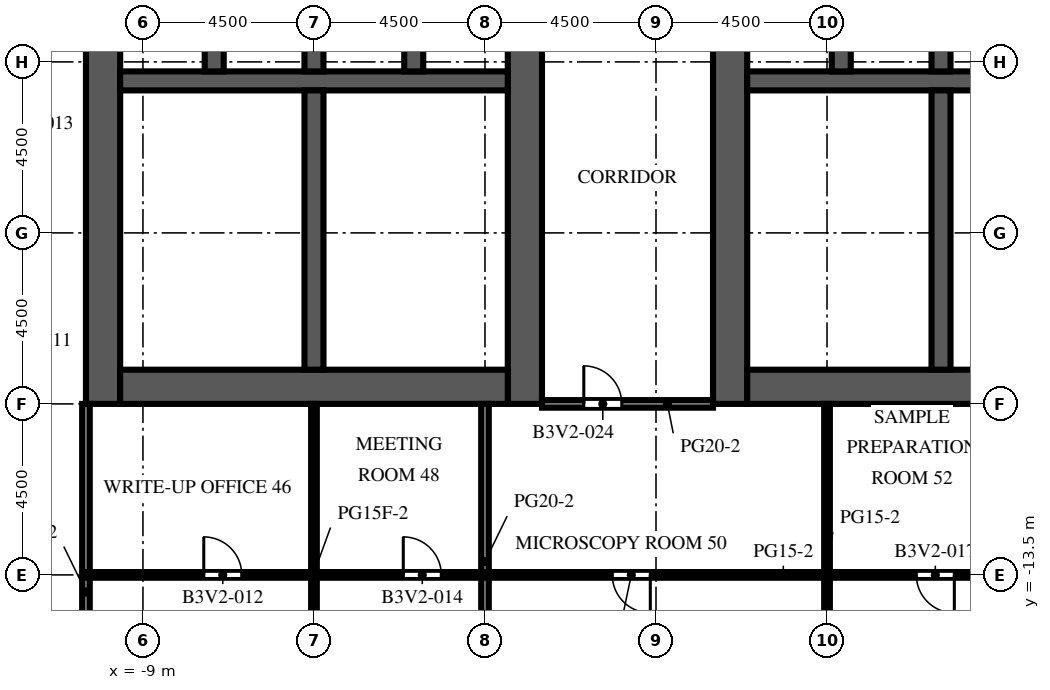
"""IFC4 building model, lengths in metres.
Left out: names, types, materials, properties, quantities, classifications, styles, units other than length and angle.
Written with IfcOpenShell. Run it as: python <this file> out.ifc"""

import sys

from ifc_helpers import new_model, si_unit, direction, frame, frame_2d, origin, place, context, subcontext, project, spatial, rectangle, extrude, element, fill, save


model = new_model("IFC4")
c1 = context("Model", 3, precision=1e-05, world=origin(), true_north=direction((0.0, 1.0)))
c2 = subcontext(c1, "Body", "Model", "MODEL_VIEW")
j1 = project(units=[si_unit("LENGTHUNIT", "METRE"), si_unit("PLANEANGLEUNIT", "RADIAN")], contexts=[c1])
p1 = place(None, origin())
s1 = spatial("IfcSite", under=j1, at=p1, CompositionType="ELEMENT")
p2 = place(p1, origin())
s2 = spatial("IfcBuilding", under=s1, at=p2, CompositionType="ELEMENT")
p3 = place(p2, frame((0.0, 0.0, 106.6)))
s3 = spatial("IfcBuildingStorey", under=s2, at=p3, CompositionType="ELEMENT", Elevation=106.6)
p4 = place(p3, frame((-10.05, -9.0, 0.0), z_axis=(0.0, 0.0, 1.0), x_axis=(0.0, 1.0, 0.0)))
e1 = element("IfcWall", 1, at=p4, inside=s3, PredefinedType="SHEAR", context=c2, shape_type="SweptSolid", body=[
    extrude(rectangle(XDim=27.5, YDim=0.9, at=frame_2d((13.75, 0.0))), origin(), (0.0, 0.0, 1.0), 4.1),
])
p5 = place(p4, frame((12.55, 0.0, 0.0)))
e2 = element("IfcOpeningElement", 2, at=p5, cuts=e1, PredefinedType="OPENING", context=c2, shape_type="SweptSolid", body=[
    extrude(rectangle(XDim=2.4, YDim=2.4, at=frame_2d((1.2, 1.2))), frame((0.0, 0.46, 0.0), z_axis=(0.0, -1.0, 0.0), x_axis=(1.0, 0.0, 0.0)), (0.0, 0.0, 1.0), 0.92),
])
p6 = place(p4, frame((6.825, 0.0, 0.0)))
e3 = element("IfcOpeningElement", 3, at=p6, cuts=e1, PredefinedType="OPENING", context=c2, shape_type="SweptSolid", body=[
    extrude(rectangle(XDim=1.2, YDim=2.1, at=frame_2d((0.6, 1.05))), frame((0.0, 0.46, 0.0), z_axis=(0.0, -1.0, 0.0), x_axis=(1.0, 0.0, 0.0)), (0.0, 0.0, 1.0), 0.92),
])
p7 = place(p4, frame((19.475, 0.0, 0.0)))
e4 = element("IfcOpeningElement", 4, at=p7, cuts=e1, PredefinedType="OPENING", context=c2, shape_type="SweptSolid", body=[
    extrude(rectangle(XDim=1.2, YDim=2.1, at=frame_2d((0.6, 1.05))), frame((0.0, 0.46, 0.0), z_axis=(0.0, -1.0, 0.0), x_axis=(1.0, 0.0, 0.0)), (0.0, 0.0, 1.0), 0.92),
])
p8 = place(p3, frame((1.05, -9.0, 0.0), z_axis=(0.0, 0.0, 1.0), x_axis=(0.0, 1.0, 0.0)))
e5 = element("IfcWall", 5, at=p8, inside=s3, PredefinedType="SHEAR", context=c2, shape_type="SweptSolid", body=[
    extrude(rectangle(XDim=27.5, YDim=0.9, at=frame_2d((13.75, 0.0))), origin(), (0.0, 0.0, 1.0), 4.1),
])
p9 = place(p8, frame((12.55, 0.0, 0.0)))
e6 = element("IfcOpeningElement", 6, at=p9, cuts=e5, PredefinedType="OPENING", context=c2, shape_type="SweptSolid", body=[
    extrude(rectangle(XDim=2.4, YDim=2.4, at=frame_2d((1.2, 1.2))), frame((0.0, 0.46, 0.0), z_axis=(0.0, -1.0, 0.0), x_axis=(1.0, 0.0, 0.0)), (0.0, 0.0, 1.0), 0.92),
])
p10 = place(p8, frame((3.893, 0.0, 0.0)))
e7 = element("IfcOpeningElement", 7, at=p10, cuts=e5, PredefinedType="OPENING", context=c2, shape_type="SweptSolid", body=[
    extrude(rectangle(XDim=0.923, YDim=2.1, at=frame_2d((0.461, 1.05))), frame((0.0, 0.46, 0.0), z_axis=(0.0, -1.0, 0.0), x_axis=(1.0, 0.0, 0.0)), (0.0, 0.0, 1.0), 0.92),
])
p11 = place(p8, frame((23.427, 0.0, 0.0)))
e8 = element("IfcOpeningElement", 8, at=p11, cuts=e5, PredefinedType="OPENING", context=c2, shape_type="SweptSolid", body=[
    extrude(rectangle(XDim=1.2, YDim=2.1, at=frame_2d((0.6, 1.05))), frame((0.0, 0.46, 0.0), z_axis=(0.0, -1.0, 0.0), x_axis=(1.0, 0.0, 0.0)), (0.0, 0.0, 1.0), 0.92),
])
p12 = place(p3, frame((-9.6, -8.55, 0.0), z_axis=(0.0, 0.0, 1.0), x_axis=(1.0, 0.0, 0.0)))
e9 = element("IfcWall", 9, at=p12, inside=s3, PredefinedType="SHEAR", context=c2, shape_type="SweptSolid", body=[
    extrude(rectangle(XDim=10.2, YDim=0.9, at=frame_2d((5.1, 0.0))), origin(), (0.0, 0.0, 1.0), 4.1),
])
p13 = place(p3, frame((-9.6, -0.5, 0.0), z_axis=(0.0, 0.0, 1.0), x_axis=(1.0, 0.0, 0.0)))
e10 = element("IfcWall", 10, at=p13, inside=s3, PredefinedType="SHEAR", context=c2, shape_type="SweptSolid", body=[
    extrude(rectangle(XDim=10.2, YDim=0.5, at=frame_2d((5.1, 0.0))), origin(), (0.0, 0.0, 1.0), 4.1),
])
for number, where, z_axis, x_axis in (
    (11, (-7.125, -0.25, 0.0), (0.0, 0.0, 1.0), (0.0, 1.0, 0.0)),
    (12, (-4.5, -0.25, 0.0), (0.0, 0.0, 1.0), (0.0, 1.0, 0.0)),
    (13, (-1.875, -0.25, 0.0), (0.0, 0.0, 1.0), (0.0, 1.0, 0.0)),
):
    element("IfcWall", number, at=place(p3, frame(where, z_axis=z_axis, x_axis=x_axis)), inside=s3, PredefinedType="SHEAR", context=c2, shape_type="SweptSolid", body=[
        extrude(rectangle(XDim=2.8, YDim=0.5, at=frame_2d((1.4, 0.0))), origin(), (0.0, 0.0, 1.0), 4.1),
    ])
p14 = place(p3, frame((-4.5, -8.1, 0.0), z_axis=(0.0, 0.0, 1.0), x_axis=(0.0, 1.0, 0.0)))
e14 = element("IfcWall", 14, at=p14, inside=s3, PredefinedType="SHEAR", context=c2, shape_type="SweptSolid", body=[
    extrude(rectangle(XDim=7.35, YDim=0.5, at=frame_2d((3.675, 0.0))), origin(), (0.0, 0.0, 1.0), 4.1),
])
p15 = place(p3, frame((6.45, -9.0, 0.0), z_axis=(0.0, 0.0, 1.0), x_axis=(0.0, 1.0, 0.0)))
e15 = element("IfcWall", 15, at=p15, inside=s3, PredefinedType="SHEAR", context=c2, shape_type="SweptSolid", body=[
    extrude(rectangle(XDim=27.5, YDim=0.9, at=frame_2d((13.75, 0.0))), origin(), (0.0, 0.0, 1.0), 4.1),
])
p16 = place(p15, frame((12.55, 0.0, 0.0)))
e16 = element("IfcOpeningElement", 16, at=p16, cuts=e15, PredefinedType="OPENING", context=c2, shape_type="SweptSolid", body=[
    extrude(rectangle(XDim=2.4, YDim=2.4, at=frame_2d((1.2, 1.2))), frame((0.0, 0.46, 0.0), z_axis=(0.0, -1.0, 0.0), x_axis=(1.0, 0.0, 0.0)), (0.0, 0.0, 1.0), 0.92),
])
p17 = place(p15, frame((3.893, 0.0, 0.0)))
e17 = element("IfcOpeningElement", 17, at=p17, cuts=e15, PredefinedType="OPENING", context=c2, shape_type="SweptSolid", body=[
    extrude(rectangle(XDim=0.923, YDim=2.1, at=frame_2d((0.461, 1.05))), frame((0.0, 0.46, 0.0), z_axis=(0.0, -1.0, 0.0), x_axis=(1.0, 0.0, 0.0)), (0.0, 0.0, 1.0), 0.92),
])
p18 = place(p15, frame((23.427, 0.0, 0.0)))
e18 = element("IfcOpeningElement", 18, at=p18, cuts=e15, PredefinedType="OPENING", context=c2, shape_type="SweptSolid", body=[
    extrude(rectangle(XDim=1.2, YDim=2.1, at=frame_2d((0.6, 1.05))), frame((0.0, 0.46, 0.0), z_axis=(0.0, -1.0, 0.0), x_axis=(1.0, 0.0, 0.0)), (0.0, 0.0, 1.0), 0.92),
])
p19 = place(p3, frame((6.9, -8.55, 0.0), z_axis=(0.0, 0.0, 1.0), x_axis=(1.0, 0.0, 0.0)))
e19 = element("IfcWall", 19, at=p19, inside=s3, PredefinedType="SHEAR", context=c2, shape_type="SweptSolid", body=[
    extrude(rectangle(XDim=10.2, YDim=0.9, at=frame_2d((5.1, 0.0))), origin(), (0.0, 0.0, 1.0), 4.1),
])
p20 = place(p3, frame((6.9, -0.5, 0.0), z_axis=(0.0, 0.0, 1.0), x_axis=(1.0, 0.0, 0.0)))
e20 = element("IfcWall", 20, at=p20, inside=s3, PredefinedType="SHEAR", context=c2, shape_type="SweptSolid", body=[
    extrude(rectangle(XDim=10.2, YDim=0.5, at=frame_2d((5.1, 0.0))), origin(), (0.0, 0.0, 1.0), 4.1),
])
for number, where, z_axis, x_axis in (
    (21, (9.375, -0.25, 0.0), (0.0, 0.0, 1.0), (0.0, 1.0, 0.0)),
    (22, (12.0, -0.25, 0.0), (0.0, 0.0, 1.0), (0.0, 1.0, 0.0)),
):
    element("IfcWall", number, at=place(p3, frame(where, z_axis=z_axis, x_axis=x_axis)), inside=s3, PredefinedType="SHEAR", context=c2, shape_type="SweptSolid", body=[
        extrude(rectangle(XDim=2.8, YDim=0.5, at=frame_2d((1.4, 0.0))), origin(), (0.0, 0.0, 1.0), 4.1),
    ])
p21 = place(p3, frame((12.0, -8.1, 0.0), z_axis=(0.0, 0.0, 1.0), x_axis=(0.0, 1.0, 0.0)))
e23 = element("IfcWall", 23, at=p21, inside=s3, PredefinedType="SHEAR", context=c2, shape_type="SweptSolid", body=[
    extrude(rectangle(XDim=7.35, YDim=0.5, at=frame_2d((3.675, 0.0))), origin(), (0.0, 0.0, 1.0), 4.1),
])
p22 = place(p3, frame((-4.25, -5.307, 0.0), z_axis=(0.0, 0.0, 1.0), x_axis=(1.0, 0.0, 0.0)))
e24 = element("IfcWall", 24, at=p22, inside=s3, PredefinedType="PARTITIONING", context=c2, shape_type="SweptSolid", body=[
    extrude(rectangle(XDim=4.85, YDim=0.1, at=frame_2d((2.425, 0.0))), origin(), (0.0, 0.0, 1.0), 3.5),
])
p23 = place(p22, frame((1.925, 0.0, 0.0)))
e25 = element("IfcOpeningElement", 25, at=p23, cuts=e24, PredefinedType="OPENING", context=c2, shape_type="SweptSolid", body=[
    extrude(rectangle(XDim=1.0, YDim=2.1, at=frame_2d((0.5, 1.05))), frame((0.0, 0.06, 0.0), z_axis=(0.0, -1.0, 0.0), x_axis=(1.0, 0.0, 0.0)), (0.0, 0.0, 1.0), 0.12),
])
p24 = place(p3, frame((-2.407, -3.984, 0.0), z_axis=(0.0, 0.0, 1.0), x_axis=(1.0, 0.0, 0.0)))
e26 = element("IfcWall", 26, at=p24, inside=s3, PredefinedType="PARTITIONING", context=c2, shape_type="SweptSolid", body=[
    extrude(rectangle(XDim=3.007, YDim=0.1, at=frame_2d((1.503, 0.0))), origin(), (0.0, 0.0, 1.0), 3.5),
])
p25 = place(p24, frame((1.003, 0.0, 0.0)))
e27 = element("IfcOpeningElement", 27, at=p25, cuts=e26, PredefinedType="OPENING", context=c2, shape_type="SweptSolid", body=[
    extrude(rectangle(XDim=1.0, YDim=2.1, at=frame_2d((0.5, 1.05))), frame((0.0, 0.06, 0.0), z_axis=(0.0, -1.0, 0.0), x_axis=(1.0, 0.0, 0.0)), (0.0, 0.0, 1.0), 0.12),
])
p26 = place(p3, frame((-4.25, -3.984, 0.0), z_axis=(0.0, 0.0, 1.0), x_axis=(1.0, 0.0, 0.0)))
e28 = element("IfcWall", 28, at=p26, inside=s3, PredefinedType="PARTITIONING", context=c2, shape_type="SweptSolid", body=[
    extrude(rectangle(XDim=1.843, YDim=0.1, at=frame_2d((0.921, 0.0))), origin(), (0.0, 0.0, 1.0), 3.5),
])
p27 = place(p26, frame((0.421, 0.0, 0.0)))
e29 = element("IfcOpeningElement", 29, at=p27, cuts=e28, PredefinedType="OPENING", context=c2, shape_type="SweptSolid", body=[
    extrude(rectangle(XDim=1.0, YDim=2.1, at=frame_2d((0.5, 1.05))), frame((0.0, 0.06, 0.0), z_axis=(0.0, -1.0, 0.0), x_axis=(1.0, 0.0, 0.0)), (0.0, 0.0, 1.0), 0.12),
])
p28 = place(p3, frame((-2.407, -3.984, 0.0), z_axis=(0.0, 0.0, 1.0), x_axis=(0.0, 1.0, 0.0)))
e30 = element("IfcWall", 30, at=p28, inside=s3, PredefinedType="PARTITIONING", context=c2, shape_type="SweptSolid", body=[
    extrude(rectangle(XDim=3.234, YDim=0.1, at=frame_2d((1.617, 0.0))), origin(), (0.0, 0.0, 1.0), 3.5),
])
p29 = place(p3, frame((6.9, -5.307, 0.0), z_axis=(0.0, 0.0, 1.0), x_axis=(1.0, 0.0, 0.0)))
e31 = element("IfcWall", 31, at=p29, inside=s3, PredefinedType="PARTITIONING", context=c2, shape_type="SweptSolid", body=[
    extrude(rectangle(XDim=4.85, YDim=0.1, at=frame_2d((2.425, 0.0))), origin(), (0.0, 0.0, 1.0), 3.5),
])
p30 = place(p29, frame((1.925, 0.0, 0.0)))
e32 = element("IfcOpeningElement", 32, at=p30, cuts=e31, PredefinedType="OPENING", context=c2, shape_type="SweptSolid", body=[
    extrude(rectangle(XDim=1.0, YDim=2.1, at=frame_2d((0.5, 1.05))), frame((0.0, 0.06, 0.0), z_axis=(0.0, -1.0, 0.0), x_axis=(1.0, 0.0, 0.0)), (0.0, 0.0, 1.0), 0.12),
])
p31 = place(p3, frame((6.9, -3.984, 0.0), z_axis=(0.0, 0.0, 1.0), x_axis=(1.0, 0.0, 0.0)))
e33 = element("IfcWall", 33, at=p31, inside=s3, PredefinedType="PARTITIONING", context=c2, shape_type="SweptSolid", body=[
    extrude(rectangle(XDim=3.007, YDim=0.1, at=frame_2d((1.503, 0.0))), origin(), (0.0, 0.0, 1.0), 3.5),
])
p32 = place(p31, frame((1.003, 0.0, 0.0)))
e34 = element("IfcOpeningElement", 34, at=p32, cuts=e33, PredefinedType="OPENING", context=c2, shape_type="SweptSolid", body=[
    extrude(rectangle(XDim=1.0, YDim=2.1, at=frame_2d((0.5, 1.05))), frame((0.0, 0.06, 0.0), z_axis=(0.0, -1.0, 0.0), x_axis=(1.0, 0.0, 0.0)), (0.0, 0.0, 1.0), 0.12),
])
p33 = place(p3, frame((9.907, -3.984, 0.0), z_axis=(0.0, 0.0, 1.0), x_axis=(1.0, 0.0, 0.0)))
e35 = element("IfcWall", 35, at=p33, inside=s3, PredefinedType="PARTITIONING", context=c2, shape_type="SweptSolid", body=[
    extrude(rectangle(XDim=1.843, YDim=0.1, at=frame_2d((0.921, 0.0))), origin(), (0.0, 0.0, 1.0), 3.5),
])
p34 = place(p33, frame((0.421, 0.0, 0.0)))
e36 = element("IfcOpeningElement", 36, at=p34, cuts=e35, PredefinedType="OPENING", context=c2, shape_type="SweptSolid", body=[
    extrude(rectangle(XDim=1.0, YDim=2.1, at=frame_2d((0.5, 1.05))), frame((0.0, 0.06, 0.0), z_axis=(0.0, -1.0, 0.0), x_axis=(1.0, 0.0, 0.0)), (0.0, 0.0, 1.0), 0.12),
])
p35 = place(p3, frame((9.907, -3.984, 0.0), z_axis=(0.0, 0.0, 1.0), x_axis=(0.0, 1.0, 0.0)))
e37 = element("IfcWall", 37, at=p35, inside=s3, PredefinedType="PARTITIONING", context=c2, shape_type="SweptSolid", body=[
    extrude(rectangle(XDim=3.234, YDim=0.1, at=frame_2d((1.617, 0.0))), origin(), (0.0, 0.0, 1.0), 3.5),
])
p36 = place(p3, frame((-10.5, -9.0, 0.0), z_axis=(0.0, 0.0, 1.0), x_axis=(0.0, -1.0, 0.0)))
e38 = element("IfcWall", 38, at=p36, inside=s3, PredefinedType="PARTITIONING", context=c2, shape_type="SweptSolid", body=[
    extrude(rectangle(XDim=13.35, YDim=0.2, at=frame_2d((6.675, 0.0))), origin(), (0.0, 0.0, 1.0), 3.5),
])
p37 = place(p36, frame((9.9, 0.0, 0.0)))
e39 = element("IfcOpeningElement", 39, at=p37, cuts=e38, PredefinedType="OPENING", context=c2, shape_type="SweptSolid", body=[
    extrude(rectangle(XDim=1.0, YDim=2.1, at=frame_2d((0.5, 1.05))), frame((0.0, 0.11, 0.0), z_axis=(0.0, -1.0, 0.0), x_axis=(1.0, 0.0, 0.0)), (0.0, 0.0, 1.0), 0.22),
])
p38 = place(p3, frame((-4.5, -9.0, 0.0), z_axis=(0.0, 0.0, 1.0), x_axis=(0.0, -1.0, 0.0)))
e40 = element("IfcWall", 40, at=p38, inside=s3, PredefinedType="PARTITIONING", context=c2, shape_type="SweptSolid", body=[
    extrude(rectangle(XDim=12.9, YDim=0.15, at=frame_2d((6.45, 0.0))), origin(), (0.0, 0.0, 1.0), 3.5),
])
p39 = place(p38, frame((8.9, 0.0, 0.0)))
e41 = element("IfcOpeningElement", 41, at=p39, cuts=e40, PredefinedType="OPENING", context=c2, shape_type="SweptSolid", body=[
    extrude(rectangle(XDim=1.0, YDim=2.1, at=frame_2d((0.5, 1.05))), frame((0.0, 0.085, 0.0), z_axis=(0.0, -1.0, 0.0), x_axis=(1.0, 0.0, 0.0)), (0.0, 0.0, 1.0), 0.17),
])
p40 = place(p3, frame((0.0, -17.3, 0.0), z_axis=(0.0, 0.0, 1.0), x_axis=(0.0, 1.0, 0.0)))
e42 = element("IfcWall", 42, at=p40, inside=s3, PredefinedType="PARTITIONING", context=c2, shape_type="SweptSolid", body=[
    extrude(rectangle(XDim=8.3, YDim=0.2, at=frame_2d((4.15, 0.0))), origin(), (0.0, 0.0, 1.0), 3.5),
])
p41 = place(p3, frame((9.0, -17.3, 0.0), z_axis=(0.0, 0.0, 1.0), x_axis=(0.0, 1.0, 0.0)))
e43 = element("IfcWall", 43, at=p41, inside=s3, PredefinedType="PARTITIONING", context=c2, shape_type="SweptSolid", body=[
    extrude(rectangle(XDim=8.3, YDim=0.15, at=frame_2d((4.15, 0.0))), origin(), (0.0, 0.0, 1.0), 3.5),
])
p42 = place(p3, frame((-10.5, -13.5, 0.0), z_axis=(0.0, 0.0, 1.0), x_axis=(1.0, 0.0, 0.0)))
e44 = element("IfcWall", 44, at=p42, inside=s3, PredefinedType="PARTITIONING", context=c2, shape_type="SweptSolid", body=[
    extrude(rectangle(XDim=28.5, YDim=0.15, at=frame_2d((14.25, 0.0))), origin(), (0.0, 0.0, 1.0), 3.5),
])
p43 = place(p42, frame((3.1, 0.0, 0.0)))
e45 = element("IfcOpeningElement", 45, at=p43, cuts=e44, PredefinedType="OPENING", context=c2, shape_type="SweptSolid", body=[
    extrude(rectangle(XDim=1.0, YDim=2.1, at=frame_2d((0.5, 1.05))), frame((0.0, 0.085, 0.0), z_axis=(0.0, -1.0, 0.0), x_axis=(1.0, 0.0, 0.0)), (0.0, 0.0, 1.0), 0.17),
])
p44 = place(p42, frame((8.35, 0.0, 0.0)))
e46 = element("IfcOpeningElement", 46, at=p44, cuts=e44, PredefinedType="OPENING", context=c2, shape_type="SweptSolid", body=[
    extrude(rectangle(XDim=1.0, YDim=2.1, at=frame_2d((0.5, 1.05))), frame((0.0, 0.085, 0.0), z_axis=(0.0, -1.0, 0.0), x_axis=(1.0, 0.0, 0.0)), (0.0, 0.0, 1.0), 0.17),
])
p45 = place(p42, frame((13.85, 0.0, 0.0)))
e47 = element("IfcOpeningElement", 47, at=p45, cuts=e44, PredefinedType="OPENING", context=c2, shape_type="SweptSolid", body=[
    extrude(rectangle(XDim=1.0, YDim=2.1, at=frame_2d((0.5, 1.05))), frame((0.0, 0.085, 0.0), z_axis=(0.0, -1.0, 0.0), x_axis=(1.0, 0.0, 0.0)), (0.0, 0.0, 1.0), 0.17),
])
p46 = place(p42, frame((21.85, 0.0, 0.0)))
e48 = element("IfcOpeningElement", 48, at=p46, cuts=e44, PredefinedType="OPENING", context=c2, shape_type="SweptSolid", body=[
    extrude(rectangle(XDim=1.0, YDim=2.1, at=frame_2d((0.5, 1.05))), frame((0.0, 0.085, 0.0), z_axis=(0.0, -1.0, 0.0), x_axis=(1.0, 0.0, 0.0)), (0.0, 0.0, 1.0), 0.17),
])
p47 = place(p42, frame((25.85, 0.0, 0.0)))
e49 = element("IfcOpeningElement", 49, at=p47, cuts=e44, PredefinedType="OPENING", context=c2, shape_type="SweptSolid", body=[
    extrude(rectangle(XDim=1.0, YDim=2.1, at=frame_2d((0.5, 1.05))), frame((0.0, 0.085, 0.0), z_axis=(0.0, -1.0, 0.0), x_axis=(1.0, 0.0, 0.0)), (0.0, 0.0, 1.0), 0.17),
])
p48 = place(p3, frame((6.0, -9.0, 0.0), z_axis=(0.0, 0.0, 1.0), x_axis=(-1.0, 0.0, 0.0)))
e50 = element("IfcWall", 50, at=p48, inside=s3, PredefinedType="PARTITIONING", context=c2, shape_type="SweptSolid", body=[
    extrude(rectangle(XDim=4.5, YDim=0.2, at=frame_2d((2.25, 0.0))), origin(), (0.0, 0.0, 1.0), 3.5),
])
p49 = place(p48, frame((2.4, 0.0, 0.0)))
e51 = element("IfcOpeningElement", 51, at=p49, cuts=e50, PredefinedType="OPENING", context=c2, shape_type="SweptSolid", body=[
    extrude(rectangle(XDim=1.0, YDim=2.1, at=frame_2d((0.5, 1.05))), frame((0.0, 0.11, 0.0), z_axis=(0.0, -1.0, 0.0), x_axis=(1.0, 0.0, 0.0)), (0.0, 0.0, 1.0), 0.22),
])
p50 = place(p6, origin())
e52 = element("IfcDoor", 52, at=p50, inside=s3, OperationType="SINGLE_SWING_LEFT", PredefinedType="DOOR", context=c2, shape_type="SweptSolid", body=[
    extrude(rectangle(XDim=1.2, YDim=2.1, at=frame_2d((0.6, 1.05))), frame((0.0, 0.025, 0.0), z_axis=(0.0, -1.0, 0.0), x_axis=(1.0, 0.0, 0.0)), (0.0, 0.0, 1.0), 0.05),
])
fill(e3, e52)
p51 = place(p10, origin())
e53 = element("IfcDoor", 53, at=p51, inside=s3, OperationType="SINGLE_SWING_LEFT", PredefinedType="DOOR", context=c2, shape_type="SweptSolid", body=[
    extrude(rectangle(XDim=0.923, YDim=2.1, at=frame_2d((0.461, 1.05))), frame((0.0, 0.425, 0.0), z_axis=(0.0, -1.0, 0.0), x_axis=(1.0, 0.0, 0.0)), (0.0, 0.0, 1.0), 0.05),
])
fill(e7, e53)
p52 = place(p23, origin())
e54 = element("IfcDoor", 54, at=p52, inside=s3, OperationType="SINGLE_SWING_RIGHT", PredefinedType="DOOR", context=c2, shape_type="SweptSolid", body=[
    extrude(rectangle(XDim=1.0, YDim=2.1, at=frame_2d((0.5, 1.05))), frame((0.0, 0.025, 0.0), z_axis=(0.0, -1.0, 0.0), x_axis=(1.0, 0.0, 0.0)), (0.0, 0.0, 1.0), 0.05),
])
fill(e25, e54)
p53 = place(p25, origin())
e55 = element("IfcDoor", 55, at=p53, inside=s3, OperationType="SINGLE_SWING_LEFT", PredefinedType="DOOR", context=c2, shape_type="SweptSolid", body=[
    extrude(rectangle(XDim=1.0, YDim=2.1, at=frame_2d((0.5, 1.05))), frame((0.0, 0.025, 0.0), z_axis=(0.0, -1.0, 0.0), x_axis=(1.0, 0.0, 0.0)), (0.0, 0.0, 1.0), 0.05),
])
fill(e27, e55)
p54 = place(p27, origin())
e56 = element("IfcDoor", 56, at=p54, inside=s3, OperationType="SINGLE_SWING_RIGHT", PredefinedType="DOOR", context=c2, shape_type="SweptSolid", body=[
    extrude(rectangle(XDim=1.0, YDim=2.1, at=frame_2d((0.5, 1.05))), frame((0.0, 0.025, 0.0), z_axis=(0.0, -1.0, 0.0), x_axis=(1.0, 0.0, 0.0)), (0.0, 0.0, 1.0), 0.05),
])
fill(e29, e56)
p55 = place(p17, origin())
e57 = element("IfcDoor", 57, at=p55, inside=s3, OperationType="SINGLE_SWING_RIGHT", PredefinedType="DOOR", context=c2, shape_type="SweptSolid", body=[
    extrude(rectangle(XDim=0.923, YDim=2.1, at=frame_2d((0.461, 1.05))), frame((0.0, -0.375, 0.0), z_axis=(0.0, -1.0, 0.0), x_axis=(1.0, 0.0, 0.0)), (0.0, 0.0, 1.0), 0.05),
])
fill(e17, e57)
p56 = place(p30, origin())
e58 = element("IfcDoor", 58, at=p56, inside=s3, OperationType="SINGLE_SWING_LEFT", PredefinedType="DOOR", context=c2, shape_type="SweptSolid", body=[
    extrude(rectangle(XDim=1.0, YDim=2.1, at=frame_2d((0.5, 1.05))), frame((0.0, 0.025, 0.0), z_axis=(0.0, -1.0, 0.0), x_axis=(1.0, 0.0, 0.0)), (0.0, 0.0, 1.0), 0.05),
])
fill(e32, e58)
p57 = place(p32, origin())
e59 = element("IfcDoor", 59, at=p57, inside=s3, OperationType="SINGLE_SWING_RIGHT", PredefinedType="DOOR", context=c2, shape_type="SweptSolid", body=[
    extrude(rectangle(XDim=1.0, YDim=2.1, at=frame_2d((0.5, 1.05))), frame((0.0, 0.025, 0.0), z_axis=(0.0, -1.0, 0.0), x_axis=(1.0, 0.0, 0.0)), (0.0, 0.0, 1.0), 0.05),
])
fill(e34, e59)
p58 = place(p34, origin())
e60 = element("IfcDoor", 60, at=p58, inside=s3, OperationType="SINGLE_SWING_LEFT", PredefinedType="DOOR", context=c2, shape_type="SweptSolid", body=[
    extrude(rectangle(XDim=1.0, YDim=2.1, at=frame_2d((0.5, 1.05))), frame((0.0, 0.025, 0.0), z_axis=(0.0, -1.0, 0.0), x_axis=(1.0, 0.0, 0.0)), (0.0, 0.0, 1.0), 0.05),
])
fill(e36, e60)
p59 = place(p43, origin())
e61 = element("IfcDoor", 61, at=p59, inside=s3, OperationType="SINGLE_SWING_LEFT", PredefinedType="DOOR", context=c2, shape_type="SweptSolid", body=[
    extrude(rectangle(XDim=1.0, YDim=2.1, at=frame_2d((0.5, 1.05))), frame((0.0, 0.025, 0.0), z_axis=(0.0, -1.0, 0.0), x_axis=(1.0, 0.0, 0.0)), (0.0, 0.0, 1.0), 0.05),
])
fill(e45, e61)
p60 = place(p44, origin())
e62 = element("IfcDoor", 62, at=p60, inside=s3, OperationType="SINGLE_SWING_LEFT", PredefinedType="DOOR", context=c2, shape_type="SweptSolid", body=[
    extrude(rectangle(XDim=1.0, YDim=2.1, at=frame_2d((0.5, 1.05))), frame((0.0, 0.025, 0.0), z_axis=(0.0, -1.0, 0.0), x_axis=(1.0, 0.0, 0.0)), (0.0, 0.0, 1.0), 0.05),
])
fill(e46, e62)
p61 = place(p45, origin())
e63 = element("IfcDoor", 63, at=p61, inside=s3, OperationType="SINGLE_SWING_RIGHT", PredefinedType="DOOR", context=c2, shape_type="SweptSolid", body=[
    extrude(rectangle(XDim=1.0, YDim=2.1, at=frame_2d((0.5, 1.05))), frame((0.0, 0.025, 0.0), z_axis=(0.0, -1.0, 0.0), x_axis=(1.0, 0.0, 0.0)), (0.0, 0.0, 1.0), 0.05),
])
fill(e47, e63)
p62 = place(p46, origin())
e64 = element("IfcDoor", 64, at=p62, inside=s3, OperationType="SINGLE_SWING_RIGHT", PredefinedType="DOOR", context=c2, shape_type="SweptSolid", body=[
    extrude(rectangle(XDim=1.0, YDim=2.1, at=frame_2d((0.5, 1.05))), frame((0.0, 0.025, 0.0), z_axis=(0.0, -1.0, 0.0), x_axis=(1.0, 0.0, 0.0)), (0.0, 0.0, 1.0), 0.05),
])
fill(e48, e64)
p63 = place(p49, origin())
e65 = element("IfcDoor", 65, at=p63, inside=s3, OperationType="SINGLE_SWING_RIGHT", PredefinedType="DOOR", context=c2, shape_type="SweptSolid", body=[
    extrude(rectangle(XDim=1.0, YDim=2.1, at=frame_2d((0.5, 1.05))), frame((0.0, 0.025, 0.0), z_axis=(0.0, -1.0, 0.0), x_axis=(1.0, 0.0, 0.0)), (0.0, 0.0, 1.0), 0.05),
])
fill(e51, e65)
save(model, sys.argv[1])
